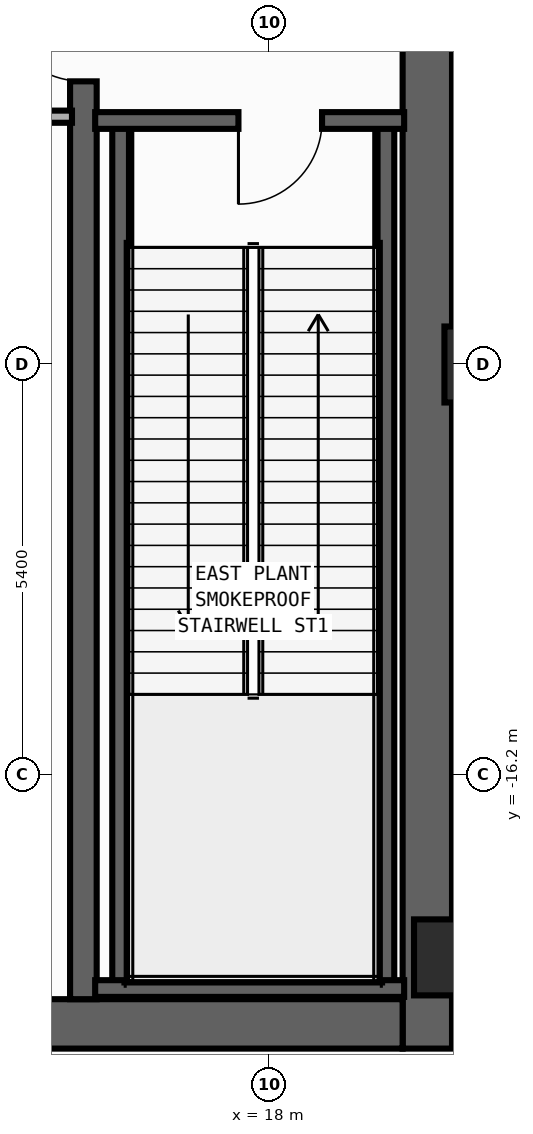
"""IFC4 building model, lengths in metres.
Left out: names, types, materials, properties, quantities, classifications, styles, units other than length and angle.
Written with IfcOpenShell. Run it as: python <this file> out.ifc"""

import sys

from ifc_helpers import new_model, si_unit, direction, frame, frame_2d, origin, origin_2d, place, context, subcontext, project, spatial, rectangle, extrude, element, fill, save


model = new_model("IFC4")
c1 = context("Model", 3, precision=1e-05, world=origin(), true_north=direction((0.0, 1.0)))
c2 = subcontext(c1, "Body", "Model", "MODEL_VIEW")
j1 = project(units=[si_unit("LENGTHUNIT", "METRE"), si_unit("PLANEANGLEUNIT", "RADIAN")], contexts=[c1])
p1 = place(None, origin())
s1 = spatial("IfcSite", under=j1, at=p1, CompositionType="ELEMENT")
p2 = place(p1, origin())
s2 = spatial("IfcBuilding", under=s1, at=p2, CompositionType="ELEMENT")
p3 = place(p2, frame((0.0, 0.0, 214.4)))
s3 = spatial("IfcBuildingStorey", under=s2, at=p3, CompositionType="ELEMENT", Elevation=214.4)
p4 = place(p3, frame((20.075, -19.8, 0.0), z_axis=(0.0, 0.0, 1.0), x_axis=(0.0, 1.0, 0.0)))
e1 = element("IfcWall", 1, at=p4, inside=s3, PredefinedType="SHEAR", context=c2, shape_type="SweptSolid", body=[
    extrude(rectangle(XDim=27.0, YDim=0.65, at=frame_2d((13.5, 0.0))), origin(), (0.0, 0.0, 1.0), 7.74),
])
p5 = place(p3, frame((12.65, -19.475, 0.0), z_axis=(0.0, 0.0, 1.0), x_axis=(1.0, 0.0, 0.0)))
e2 = element("IfcWall", 2, at=p5, inside=s3, PredefinedType="SHEAR", context=c2, shape_type="SweptSolid", body=[
    extrude(rectangle(XDim=7.1, YDim=0.65, at=frame_2d((3.55, 0.0))), origin(), (0.0, 0.0, 1.0), 7.74),
])
p6 = place(p3, frame((15.55, -19.15, 0.0), z_axis=(0.0, 0.0, 1.0), x_axis=(0.0, 1.0, 0.0)))
e3 = element("IfcWall", 3, at=p6, inside=s3, PredefinedType="SHEAR", context=c2, shape_type="SweptSolid", body=[
    extrude(rectangle(XDim=25.7, YDim=0.35, at=frame_2d((12.85, 0.0))), origin(), (0.0, 0.0, 1.0), 7.74),
])
p7 = place(p6, frame((12.075, 0.0, 0.0)))
e4 = element("IfcOpeningElement", 4, at=p7, cuts=e3, PredefinedType="OPENING", context=c2, shape_type="SweptSolid", body=[
    extrude(rectangle(XDim=1.15, YDim=2.2, at=frame_2d((0.575, 1.1))), frame((0.0, 0.185, 0.0), z_axis=(0.0, -1.0, 0.0), x_axis=(1.0, 0.0, 0.0)), (0.0, 0.0, 1.0), 0.37),
])
p8 = place(p6, frame((24.475, 0.0, 0.0)))
e5 = element("IfcOpeningElement", 5, at=p8, cuts=e3, PredefinedType="OPENING", context=c2, shape_type="SweptSolid", body=[
    extrude(rectangle(XDim=0.85, YDim=2.1, at=frame_2d((0.425, 1.05))), frame((0.0, 0.185, 0.0), z_axis=(0.0, -1.0, 0.0), x_axis=(1.0, 0.0, 0.0)), (0.0, 0.0, 1.0), 0.37),
])
for number, where, z_axis, x_axis in (
    (6, (16.04, -19.01, 0.0), (0.0, 0.0, 1.0), (0.0, 1.0, 0.0)),
    (7, (19.53, -19.01, 0.0), (0.0, 0.0, 1.0), (0.0, 1.0, 0.0)),
):
    element("IfcWall", number, at=place(p3, frame(where, z_axis=z_axis, x_axis=x_axis)), inside=s3, PredefinedType="SHEAR", context=c2, shape_type="SweptSolid", body=[
        extrude(rectangle(XDim=11.42, YDim=0.22, at=frame_2d((5.71, 0.0))), origin(), (0.0, 0.0, 1.0), 7.74),
    ])
p9 = place(p3, frame((15.705, -19.01, 0.0), z_axis=(0.0, 0.0, 1.0), x_axis=(1.0, 0.0, 0.0)))
e8 = element("IfcWall", 8, at=p9, inside=s3, PredefinedType="SHEAR", context=c2, shape_type="SweptSolid", body=[
    extrude(rectangle(XDim=4.065, YDim=0.22, at=frame_2d((2.032, 0.0))), origin(), (0.0, 0.0, 1.0), 7.74),
])
p10 = place(p3, frame((19.77, -7.59, 0.0), z_axis=(0.0, 0.0, 1.0), x_axis=(-1.0, 0.0, 0.0)))
e9 = element("IfcWall", 9, at=p10, inside=s3, PredefinedType="SHEAR", context=c2, shape_type="SweptSolid", body=[
    extrude(rectangle(XDim=4.065, YDim=0.22, at=frame_2d((2.032, 0.0))), origin(), (0.0, 0.0, 1.0), 7.74),
])
p11 = place(p10, frame((1.08, 0.0, 0.0)))
e10 = element("IfcOpeningElement", 10, at=p11, cuts=e9, PredefinedType="OPENING", context=c2, shape_type="SweptSolid", body=[
    extrude(rectangle(XDim=1.1, YDim=2.2, at=frame_2d((0.55, 1.1))), frame((0.0, 0.12, 0.0), z_axis=(0.0, -1.0, 0.0), x_axis=(1.0, 0.0, 0.0)), (0.0, 0.0, 1.0), 0.24),
])
for number, where, z_axis, x_axis in (
    (11, (20.4, -18.6, 0.0), (0.0, 0.0, 1.0), (1.0, 0.0, 0.0)),
    (12, (20.8, -10.8, 0.0), (0.0, 0.0, 1.0), (1.0, 0.0, 0.0)),
):
    element("IfcColumn", number, at=place(p3, frame(where, z_axis=z_axis, x_axis=x_axis)), inside=s3, PredefinedType="COLUMN", context=c2, shape_type="SweptSolid", body=[
        extrude(rectangle(XDim=1.0, YDim=1.0, at=origin_2d()), origin(), (0.0, 0.0, 1.0), 8.0),
    ])
p12 = place(p3, frame((12.8, -7.54, 0.0), z_axis=(0.0, 0.0, 1.0), x_axis=(1.0, 0.0, 0.0)))
e13 = element("IfcWall", 13, at=p12, inside=s3, PredefinedType="STANDARD", context=c2, shape_type="SweptSolid", body=[
    extrude(rectangle(XDim=2.6, YDim=0.16, at=frame_2d((1.3, 0.0))), origin(), (0.0, 0.0, 1.0), 7.74),
])
p13 = place(p11, origin())
e14 = element("IfcDoor", 14, at=p13, inside=s3, OperationType="SINGLE_SWING_RIGHT", PredefinedType="DOOR", context=c2, shape_type="SweptSolid", body=[
    extrude(rectangle(XDim=1.1, YDim=2.2, at=frame_2d((0.55, 1.1))), frame((0.0, 0.025, 0.0), z_axis=(0.0, -1.0, 0.0), x_axis=(1.0, 0.0, 0.0)), (0.0, 0.0, 1.0), 0.05),
])
fill(e10, e14)
p14 = place(p7, origin())
e15 = element("IfcDoor", 15, at=p14, inside=s3, OperationType="SINGLE_SWING_RIGHT", PredefinedType="DOOR", context=c2, shape_type="SweptSolid", body=[
    extrude(rectangle(XDim=1.15, YDim=2.2, at=frame_2d((0.575, 1.1))), frame((0.0, 0.025, 0.0), z_axis=(0.0, -1.0, 0.0), x_axis=(1.0, 0.0, 0.0)), (0.0, 0.0, 1.0), 0.05),
])
fill(e4, e15)
save(model, sys.argv[1])
